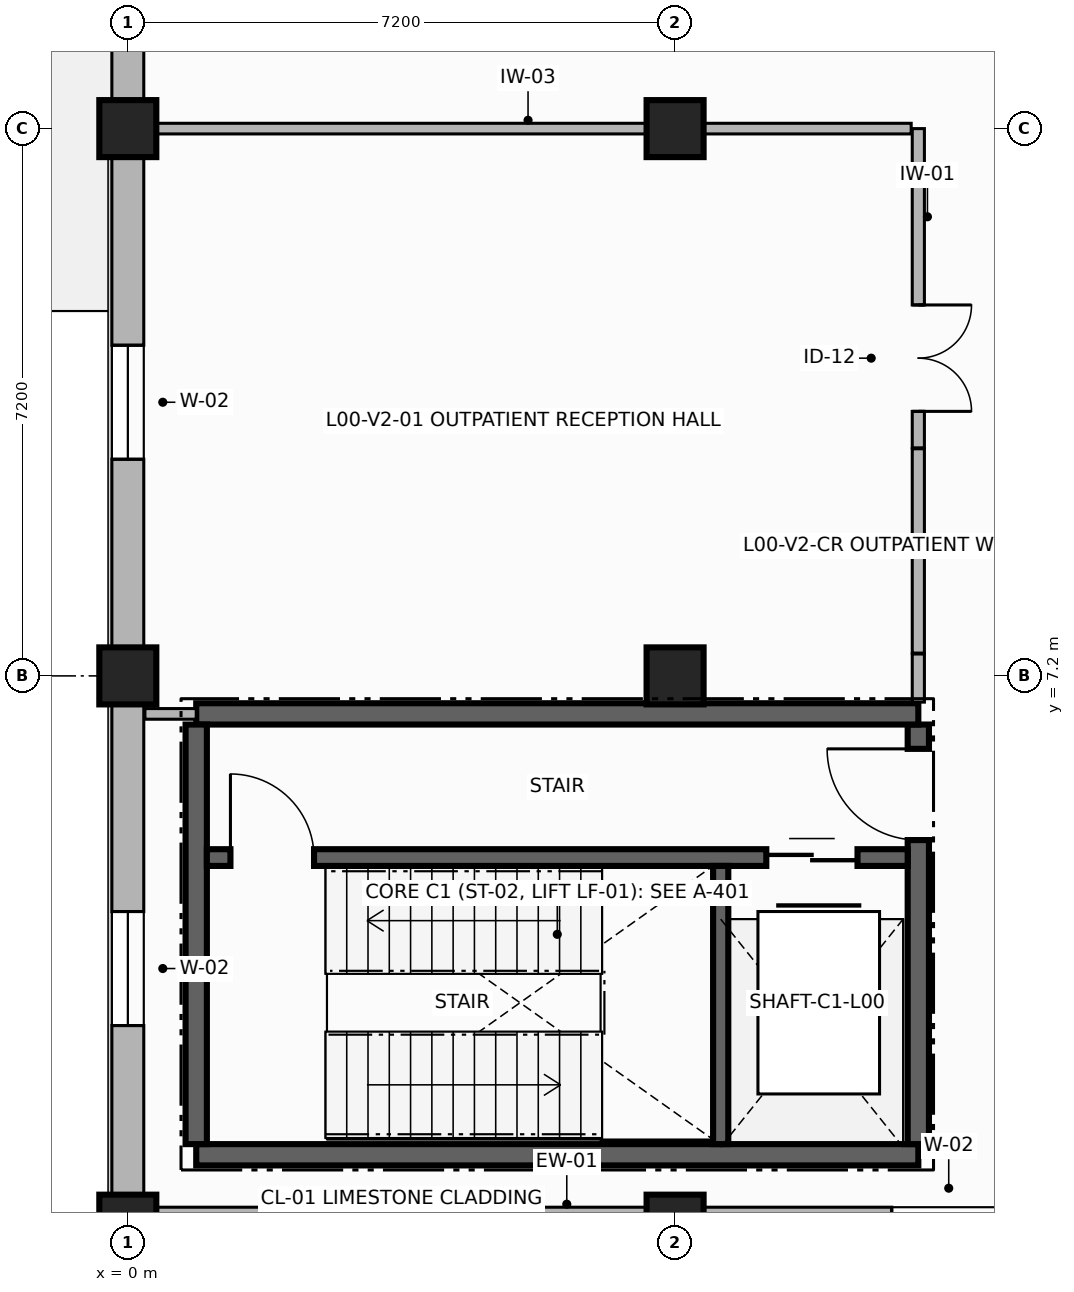
"""IFC4 building model, lengths in metres.
Left out: names, types, materials, properties, quantities, classifications, styles, units other than length and angle.
Written with IfcOpenShell. Run it as: python <this file> out.ifc"""

import sys

from ifc_helpers import new_model, si_unit, direction, frame, frame_2d, origin, origin_with_axes, origin_2d, place, context, subcontext, project, spatial, rectangle, extrude, element, fill, save


model = new_model("IFC4")
c1 = context("Model", 3, precision=1e-05, world=origin(), true_north=direction((0.0, 1.0)))
c2 = subcontext(c1, "Body", "Model", "MODEL_VIEW")
j1 = project(units=[si_unit("LENGTHUNIT", "METRE"), si_unit("PLANEANGLEUNIT", "RADIAN")], contexts=[c1])
p1 = place(None, origin())
s1 = spatial("IfcSite", under=j1, at=p1, CompositionType="ELEMENT")
p2 = place(p1, origin())
s2 = spatial("IfcBuilding", under=s1, at=p2, CompositionType="ELEMENT")
p3 = place(p2, origin())
s3 = spatial("IfcBuildingStorey", under=s2, at=p3, CompositionType="ELEMENT", Elevation=0.0)
for number, where, z_axis, x_axis in (
    (1, (0.0, 0.0, 0.0), (0.0, 0.0, 1.0), (1.0, 0.0, 0.0)),
    (2, (0.0, 7.2, 0.0), (0.0, 0.0, 1.0), (1.0, 0.0, 0.0)),
    (3, (0.0, 14.4, 0.0), (0.0, 0.0, 1.0), (1.0, 0.0, 0.0)),
    (4, (7.2, 0.0, 0.0), (0.0, 0.0, 1.0), (1.0, 0.0, 0.0)),
    (5, (7.2, 7.2, 0.0), (0.0, 0.0, 1.0), (1.0, 0.0, 0.0)),
    (6, (7.2, 14.4, 0.0), (0.0, 0.0, 1.0), (1.0, 0.0, 0.0)),
):
    element("IfcColumn", number, at=place(p3, frame(where, z_axis=z_axis, x_axis=x_axis)), inside=s3, PredefinedType="COLUMN", context=c2, shape_type="SweptSolid", body=[
        extrude(rectangle(XDim=0.75, YDim=0.75, at=origin_2d()), origin(), (0.0, 0.0, 1.0), 4.22),
    ])
p4 = place(p3, origin_with_axes())
e7 = element("IfcWall", 7, at=p4, inside=s3, PredefinedType="SOLIDWALL", context=c2, shape_type="SweptSolid", body=[
    extrude(rectangle(XDim=7.2, YDim=0.42, at=frame_2d((3.6, 0.0))), origin(), (0.0, 0.0, 1.0), 3.6),
])
p5 = place(p4, frame((2.85, 0.0, 0.85)))
e8 = element("IfcOpeningElement", 8, at=p5, cuts=e7, PredefinedType="OPENING", context=c2, shape_type="SweptSolid", body=[
    extrude(rectangle(XDim=1.5, YDim=2.5, at=frame_2d((0.75, 1.25))), frame((0.0, 0.22, 0.0), z_axis=(0.0, -1.0, 0.0), x_axis=(1.0, 0.0, 0.0)), (0.0, 0.0, 1.0), 0.44),
])
p6 = place(p3, frame((7.2, 0.0, 0.0), z_axis=(0.0, 0.0, 1.0), x_axis=(1.0, 0.0, 0.0)))
e9 = element("IfcWall", 9, at=p6, inside=s3, PredefinedType="SOLIDWALL", context=c2, shape_type="SweptSolid", body=[
    extrude(rectangle(XDim=7.2, YDim=0.42, at=frame_2d((3.6, 0.0))), origin(), (0.0, 0.0, 1.0), 3.6),
])
p7 = place(p6, frame((2.85, 0.0, 0.85)))
e10 = element("IfcOpeningElement", 10, at=p7, cuts=e9, PredefinedType="OPENING", context=c2, shape_type="SweptSolid", body=[
    extrude(rectangle(XDim=1.5, YDim=2.5, at=frame_2d((0.75, 1.25))), frame((0.0, 0.22, 0.0), z_axis=(0.0, -1.0, 0.0), x_axis=(1.0, 0.0, 0.0)), (0.0, 0.0, 1.0), 0.44),
])
p8 = place(p3, frame((0.0, 21.6, 0.0), z_axis=(0.0, 0.0, 1.0), x_axis=(0.0, -1.0, 0.0)))
e11 = element("IfcWall", 11, at=p8, inside=s3, PredefinedType="SOLIDWALL", context=c2, shape_type="SweptSolid", body=[
    extrude(rectangle(XDim=7.2, YDim=0.42, at=frame_2d((3.6, 0.0))), origin(), (0.0, 0.0, 1.0), 3.6),
])
p9 = place(p8, frame((2.6, 0.0, 0.0)))
e12 = element("IfcOpeningElement", 12, at=p9, cuts=e11, PredefinedType="OPENING", context=c2, shape_type="SweptSolid", body=[
    extrude(rectangle(XDim=2.0, YDim=2.5, at=frame_2d((1.0, 1.25))), frame((0.0, 0.22, 0.0), z_axis=(0.0, -1.0, 0.0), x_axis=(1.0, 0.0, 0.0)), (0.0, 0.0, 1.0), 0.44),
])
p10 = place(p3, frame((0.0, 14.4, 0.0), z_axis=(0.0, 0.0, 1.0), x_axis=(0.0, -1.0, 0.0)))
e13 = element("IfcWall", 13, at=p10, inside=s3, PredefinedType="SOLIDWALL", context=c2, shape_type="SweptSolid", body=[
    extrude(rectangle(XDim=7.2, YDim=0.42, at=frame_2d((3.6, 0.0))), origin(), (0.0, 0.0, 1.0), 3.6),
])
p11 = place(p10, frame((2.85, 0.0, 0.85)))
e14 = element("IfcOpeningElement", 14, at=p11, cuts=e13, PredefinedType="OPENING", context=c2, shape_type="SweptSolid", body=[
    extrude(rectangle(XDim=1.5, YDim=2.5, at=frame_2d((0.75, 1.25))), frame((0.0, 0.22, 0.0), z_axis=(0.0, -1.0, 0.0), x_axis=(1.0, 0.0, 0.0)), (0.0, 0.0, 1.0), 0.44),
])
p12 = place(p3, frame((0.0, 7.2, 0.0), z_axis=(0.0, 0.0, 1.0), x_axis=(0.0, -1.0, 0.0)))
e15 = element("IfcWall", 15, at=p12, inside=s3, PredefinedType="SOLIDWALL", context=c2, shape_type="SweptSolid", body=[
    extrude(rectangle(XDim=7.2, YDim=0.42, at=frame_2d((3.6, 0.0))), origin(), (0.0, 0.0, 1.0), 3.6),
])
p13 = place(p12, frame((3.1, 0.0, 0.85)))
e16 = element("IfcOpeningElement", 16, at=p13, cuts=e15, PredefinedType="OPENING", context=c2, shape_type="SweptSolid", body=[
    extrude(rectangle(XDim=1.5, YDim=2.5, at=frame_2d((0.75, 1.25))), frame((0.0, 0.22, 0.0), z_axis=(0.0, -1.0, 0.0), x_axis=(1.0, 0.0, 0.0)), (0.0, 0.0, 1.0), 0.44),
])
p14 = place(p3, frame((0.9, 0.9, 0.0), z_axis=(0.0, 0.0, 1.0), x_axis=(1.0, 0.0, 0.0)))
e17 = element("IfcWall", 17, at=p14, inside=s3, PredefinedType="SHEAR", context=c2, shape_type="SweptSolid", body=[
    extrude(rectangle(XDim=9.5, YDim=0.28, at=frame_2d((4.75, 0.0))), origin(), (0.0, 0.0, 1.0), 4.22),
])
p15 = place(p3, frame((10.4, 1.04, 0.0), z_axis=(0.0, 0.0, 1.0), x_axis=(0.0, 1.0, 0.0)))
e18 = element("IfcWall", 18, at=p15, inside=s3, PredefinedType="SHEAR", context=c2, shape_type="SweptSolid", body=[
    extrude(rectangle(XDim=5.52, YDim=0.28, at=frame_2d((2.76, 0.0))), origin(), (0.0, 0.0, 1.0), 4.22),
])
p16 = place(p15, frame((4.0, 0.0, 0.0)))
e19 = element("IfcOpeningElement", 19, at=p16, cuts=e18, PredefinedType="OPENING", context=c2, shape_type="SweptSolid", body=[
    extrude(rectangle(XDim=1.2, YDim=2.25, at=frame_2d((0.6, 1.125))), frame((0.0, 0.15, 0.0), z_axis=(0.0, -1.0, 0.0), x_axis=(1.0, 0.0, 0.0)), (0.0, 0.0, 1.0), 0.3),
])
p17 = place(p3, frame((10.4, 6.7, 0.0), z_axis=(0.0, 0.0, 1.0), x_axis=(-1.0, 0.0, 0.0)))
e20 = element("IfcWall", 20, at=p17, inside=s3, PredefinedType="SHEAR", context=c2, shape_type="SweptSolid", body=[
    extrude(rectangle(XDim=9.5, YDim=0.28, at=frame_2d((4.75, 0.0))), origin(), (0.0, 0.0, 1.0), 4.22),
])
p18 = place(p3, frame((0.9, 6.56, 0.0), z_axis=(0.0, 0.0, 1.0), x_axis=(0.0, -1.0, 0.0)))
e21 = element("IfcWall", 21, at=p18, inside=s3, PredefinedType="SHEAR", context=c2, shape_type="SweptSolid", body=[
    extrude(rectangle(XDim=5.52, YDim=0.28, at=frame_2d((2.76, 0.0))), origin(), (0.0, 0.0, 1.0), 4.22),
])
p19 = place(p3, frame((1.04, 4.81, 0.0), z_axis=(0.0, 0.0, 1.0), x_axis=(1.0, 0.0, 0.0)))
e22 = element("IfcWall", 22, at=p19, inside=s3, PredefinedType="SHEAR", context=c2, shape_type="SweptSolid", body=[
    extrude(rectangle(XDim=9.22, YDim=0.22, at=frame_2d((4.61, 0.0))), origin(), (0.0, 0.0, 1.0), 4.22),
])
p20 = place(p19, frame((0.31, 0.0, 0.0)))
e23 = element("IfcOpeningElement", 23, at=p20, cuts=e22, PredefinedType="OPENING", context=c2, shape_type="SweptSolid", body=[
    extrude(rectangle(XDim=1.1, YDim=2.15, at=frame_2d((0.55, 1.075))), frame((0.0, 0.12, 0.0), z_axis=(0.0, -1.0, 0.0), x_axis=(1.0, 0.0, 0.0)), (0.0, 0.0, 1.0), 0.24),
])
p21 = place(p19, frame((7.36, 0.0, 0.0)))
e24 = element("IfcOpeningElement", 24, at=p21, cuts=e22, PredefinedType="OPENING", context=c2, shape_type="SweptSolid", body=[
    extrude(rectangle(XDim=1.2, YDim=2.2, at=frame_2d((0.6, 1.1))), frame((0.0, 0.12, 0.0), z_axis=(0.0, -1.0, 0.0), x_axis=(1.0, 0.0, 0.0)), (0.0, 0.0, 1.0), 0.24),
])
p22 = place(p3, frame((7.8, 1.04, 0.0), z_axis=(0.0, 0.0, 1.0), x_axis=(0.0, 1.0, 0.0)))
e25 = element("IfcWall", 25, at=p22, inside=s3, PredefinedType="SHEAR", context=c2, shape_type="SweptSolid", body=[
    extrude(rectangle(XDim=3.66, YDim=0.2, at=frame_2d((1.83, 0.0))), origin(), (0.0, 0.0, 1.0), 4.22),
])
p23 = place(p3, frame((10.4, 14.4, 0.0), z_axis=(0.0, 0.0, 1.0), x_axis=(0.0, -1.0, 0.0)))
e26 = element("IfcWall", 26, at=p23, inside=s3, PredefinedType="PARTITIONING", context=c2, shape_type="SweptSolid", body=[
    extrude(rectangle(XDim=4.2, YDim=0.16, at=frame_2d((2.1, 0.0))), origin(), (0.0, 0.0, 1.0), 3.58),
])
p24 = place(p23, frame((2.32, 0.0, 0.0)))
e27 = element("IfcOpeningElement", 27, at=p24, cuts=e26, PredefinedType="OPENING", context=c2, shape_type="SweptSolid", body=[
    extrude(rectangle(XDim=1.4, YDim=2.3, at=frame_2d((0.7, 1.15))), frame((0.0, 0.09, 0.0), z_axis=(0.0, -1.0, 0.0), x_axis=(1.0, 0.0, 0.0)), (0.0, 0.0, 1.0), 0.18),
])
p25 = place(p3, frame((10.4, 10.188, 0.0), z_axis=(0.0, 0.0, 1.0), x_axis=(0.0, -1.0, 0.0)))
e28 = element("IfcWall", 28, at=p25, inside=s3, PredefinedType="PARTITIONING", context=c2, shape_type="SweptSolid", body=[
    extrude(rectangle(XDim=2.688, YDim=0.16, at=frame_2d((1.344, 0.0))), origin(), (0.0, 0.0, 1.0), 3.58),
])
p26 = place(p3, frame((10.4, 7.488, 0.0), z_axis=(0.0, 0.0, 1.0), x_axis=(0.0, -1.0, 0.0)))
e29 = element("IfcWall", 29, at=p26, inside=s3, PredefinedType="PARTITIONING", context=c2, shape_type="SweptSolid", body=[
    extrude(rectangle(XDim=0.633, YDim=0.16, at=frame_2d((0.316, 0.0))), origin(), (0.0, 0.0, 1.0), 3.58),
])
p27 = place(p3, frame((0.9, 6.7, 0.0), z_axis=(0.0, 0.0, 1.0), x_axis=(-1.0, 0.0, 0.0)))
e30 = element("IfcWall", 30, at=p27, inside=s3, PredefinedType="PARTITIONING", context=c2, shape_type="SweptSolid", body=[
    extrude(rectangle(XDim=0.675, YDim=0.14, at=frame_2d((0.337, 0.0))), origin(), (0.0, 0.0, 1.0), 3.58),
])
p28 = place(p3, frame((0.225, 14.4, 0.0), z_axis=(0.0, 0.0, 1.0), x_axis=(1.0, 0.0, 0.0)))
e31 = element("IfcWall", 31, at=p28, inside=s3, PredefinedType="PARTITIONING", context=c2, shape_type="SweptSolid", body=[
    extrude(rectangle(XDim=10.081, YDim=0.14, at=frame_2d((5.041, 0.0))), origin(), (0.0, 0.0, 1.0), 3.58),
])
p29 = place(p11, origin())
e32 = element("IfcWindow", 32, at=p29, inside=s3, PartitioningType="SINGLE_PANEL", PredefinedType="WINDOW", context=c2, shape_type="SweptSolid", body=[
    extrude(rectangle(XDim=1.5, YDim=2.5, at=frame_2d((0.75, 1.25))), frame((0.0, 0.03, 0.0), z_axis=(0.0, -1.0, 0.0), x_axis=(1.0, 0.0, 0.0)), (0.0, 0.0, 1.0), 0.06),
])
fill(e14, e32)
p30 = place(p13, origin())
e33 = element("IfcWindow", 33, at=p30, inside=s3, PartitioningType="SINGLE_PANEL", PredefinedType="WINDOW", context=c2, shape_type="SweptSolid", body=[
    extrude(rectangle(XDim=1.5, YDim=2.5, at=frame_2d((0.75, 1.25))), frame((0.0, 0.03, 0.0), z_axis=(0.0, -1.0, 0.0), x_axis=(1.0, 0.0, 0.0)), (0.0, 0.0, 1.0), 0.06),
])
fill(e16, e33)
p31 = place(p20, origin())
e34 = element("IfcDoor", 34, at=p31, inside=s3, OperationType="SINGLE_SWING_LEFT", PredefinedType="DOOR", context=c2, shape_type="SweptSolid", body=[
    extrude(rectangle(XDim=1.1, YDim=2.15, at=frame_2d((0.55, 1.075))), frame((0.0, 0.025, 0.0), z_axis=(0.0, -1.0, 0.0), x_axis=(1.0, 0.0, 0.0)), (0.0, 0.0, 1.0), 0.05),
])
fill(e23, e34)
p32 = place(p21, origin())
e35 = element("IfcDoor", 35, at=p32, inside=s3, OperationType="DOUBLE_DOOR_SLIDING", PredefinedType="DOOR", context=c2, shape_type="SweptSolid", body=[
    extrude(rectangle(XDim=1.2, YDim=2.2, at=frame_2d((0.6, 1.1))), frame((0.0, 0.025, 0.0), z_axis=(0.0, -1.0, 0.0), x_axis=(1.0, 0.0, 0.0)), (0.0, 0.0, 1.0), 0.05),
])
fill(e24, e35)
p33 = place(p16, origin())
e36 = element("IfcDoor", 36, at=p33, inside=s3, OperationType="SINGLE_SWING_RIGHT", PredefinedType="DOOR", context=c2, shape_type="SweptSolid", body=[
    extrude(rectangle(XDim=1.2, YDim=2.25, at=frame_2d((0.6, 1.125))), frame((0.0, 0.025, 0.0), z_axis=(0.0, -1.0, 0.0), x_axis=(1.0, 0.0, 0.0)), (0.0, 0.0, 1.0), 0.05),
])
fill(e19, e36)
p34 = place(p24, origin())
e37 = element("IfcDoor", 37, at=p34, inside=s3, OperationType="DOUBLE_DOOR_SINGLE_SWING", PredefinedType="DOOR", context=c2, shape_type="SweptSolid", body=[
    extrude(rectangle(XDim=1.4, YDim=2.3, at=frame_2d((0.7, 1.15))), frame((0.0, 0.025, 0.0), z_axis=(0.0, -1.0, 0.0), x_axis=(1.0, 0.0, 0.0)), (0.0, 0.0, 1.0), 0.05),
])
fill(e27, e37)
save(model, sys.argv[1])
